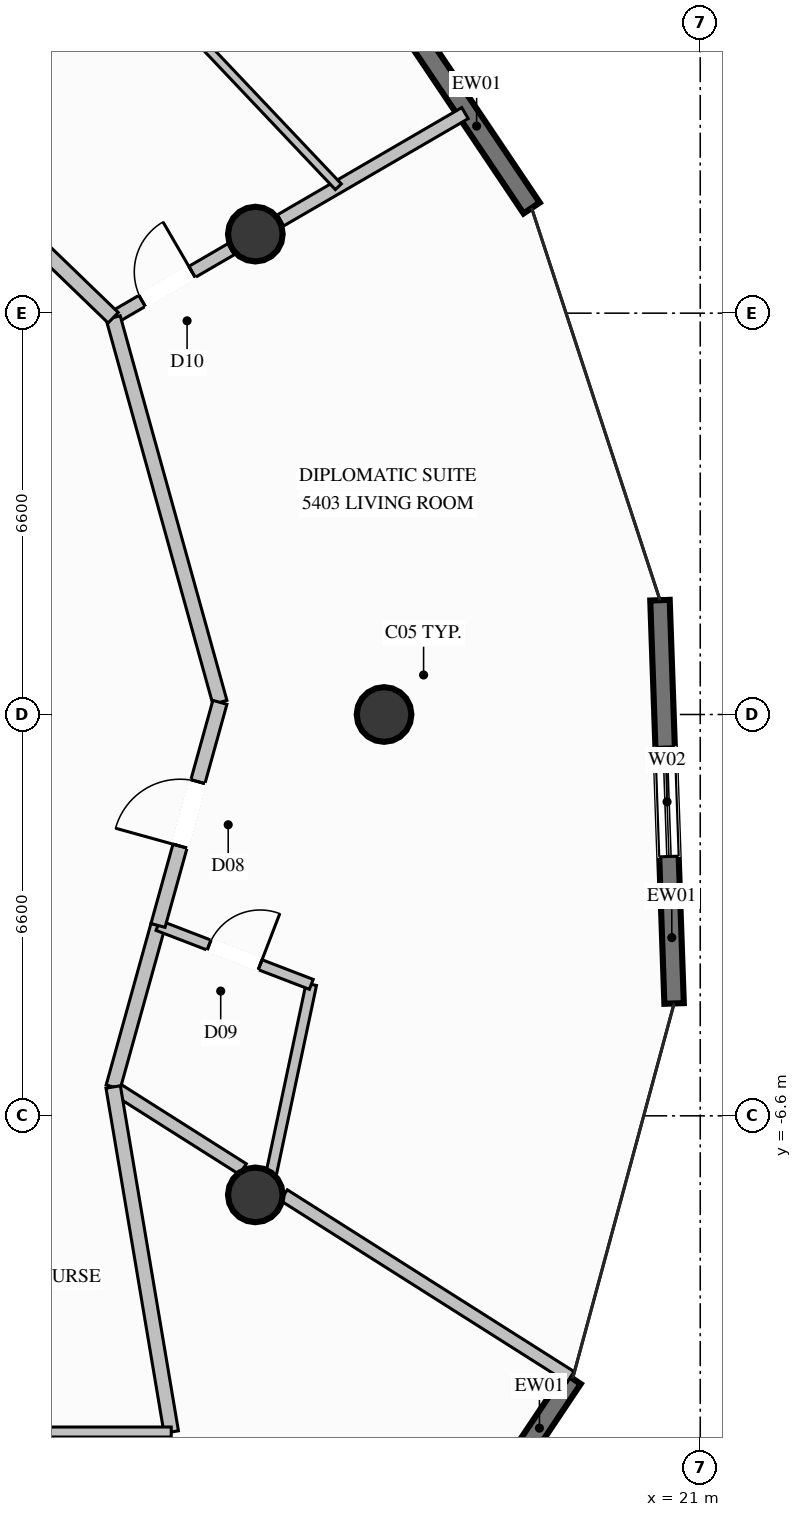
"""IFC4 building model, lengths in metres.
Left out: names, types, materials, properties, quantities, classifications, styles, units other than length and angle.
Written with IfcOpenShell. Run it as: python <this file> out.ifc"""

import sys

from ifc_helpers import new_model, si_unit, direction, frame, frame_2d, origin, origin_2d, place, context, subcontext, project, spatial, rectangle, circle, extrude, element, fill, save


model = new_model("IFC4")
c1 = context("Model", 3, precision=1e-05, world=origin(), true_north=direction((0.0, 1.0)))
c2 = subcontext(c1, "Body", "Model", "MODEL_VIEW")
j1 = project(units=[si_unit("LENGTHUNIT", "METRE"), si_unit("PLANEANGLEUNIT", "RADIAN")], contexts=[c1])
p1 = place(None, origin())
s1 = spatial("IfcSite", under=j1, at=p1, CompositionType="ELEMENT")
p2 = place(p1, origin())
s2 = spatial("IfcBuilding", under=s1, at=p2, CompositionType="ELEMENT")
p3 = place(p2, frame((0.0, 0.0, 202.0)))
s3 = spatial("IfcBuildingStorey", under=s2, at=p3, CompositionType="ELEMENT", Elevation=202.0)
for number, where, z_axis, x_axis in (
    (1, (15.8, 0.0, 0.0), (0.0, 0.0, 1.0), (1.0, 0.0, 0.0)),
    (2, (13.683, 7.9, 0.0), (0.0, 0.0, 1.0), (1.0, 0.0, 0.0)),
    (3, (13.683, -7.9, 0.0), (0.0, 0.0, 1.0), (1.0, 0.0, 0.0)),
):
    element("IfcColumn", number, at=place(p3, frame(where, z_axis=z_axis, x_axis=x_axis)), inside=s3, PredefinedType="COLUMN", context=c2, shape_type="SweptSolid", body=[
        extrude(circle(Radius=0.45, at=origin_2d()), origin(), (0.0, 0.0, 1.0), 3.6),
    ])
p4 = place(p3, frame((18.901, -10.92, 0.0), z_axis=(0.0, 0.0, 1.0), x_axis=(-0.55549022161, -0.831523068649, 0.0)))
e4 = element("IfcWall", 4, at=p4, inside=s3, PredefinedType="SOLIDWALL", context=c2, shape_type="SweptSolid", body=[
    extrude(rectangle(XDim=6.131, YDim=0.32, at=frame_2d((3.065, 0.0))), origin(), (0.0, 0.0, 1.0), 3.36),
])
p5 = place(p4, frame((2.214, 0.0, 0.35)))
e5 = element("IfcOpeningElement", 5, at=p5, cuts=e4, PredefinedType="OPENING", context=c2, shape_type="SweptSolid", body=[
    extrude(rectangle(XDim=1.8, YDim=2.6, at=frame_2d((0.9, 1.3))), frame((0.0, 0.17, 0.0), z_axis=(0.0, -1.0, 0.0), x_axis=(1.0, 0.0, 0.0)), (0.0, 0.0, 1.0), 0.34),
])
p6 = place(p3, frame((20.338, 1.88, 0.0), z_axis=(0.0, 0.0, 1.0), x_axis=(0.034988136102, -0.999387727727, 0.0)))
e6 = element("IfcWall", 6, at=p6, inside=s3, PredefinedType="SOLIDWALL", context=c2, shape_type="SweptSolid", body=[
    extrude(rectangle(XDim=6.636, YDim=0.32, at=frame_2d((3.318, 0.0))), origin(), (0.0, 0.0, 1.0), 3.36),
])
p7 = place(p6, frame((2.418, 0.0, 0.35)))
e7 = element("IfcOpeningElement", 7, at=p7, cuts=e6, PredefinedType="OPENING", context=c2, shape_type="SweptSolid", body=[
    extrude(rectangle(XDim=1.8, YDim=2.6, at=frame_2d((0.9, 1.3))), frame((0.0, 0.17, 0.0), z_axis=(0.0, -1.0, 0.0), x_axis=(1.0, 0.0, 0.0)), (0.0, 0.0, 1.0), 0.34),
])
p8 = place(p3, frame((14.445, 13.962, 0.0), z_axis=(0.0, 0.0, 1.0), x_axis=(0.557429227347, -0.830224461516, 0.0)))
e8 = element("IfcWall", 8, at=p8, inside=s3, PredefinedType="SOLIDWALL", context=c2, shape_type="SweptSolid", body=[
    extrude(rectangle(XDim=6.785, YDim=0.32, at=frame_2d((3.392, 0.0))), origin(), (0.0, 0.0, 1.0), 3.36),
])
p9 = place(p8, frame((1.489, 0.0, 0.35)))
e9 = element("IfcOpeningElement", 9, at=p9, cuts=e8, PredefinedType="OPENING", context=c2, shape_type="SweptSolid", body=[
    extrude(rectangle(XDim=1.8, YDim=2.6, at=frame_2d((0.9, 1.3))), frame((0.0, 0.17, 0.0), z_axis=(0.0, -1.0, 0.0), x_axis=(1.0, 0.0, 0.0)), (0.0, 0.0, 1.0), 0.34),
])
p10 = place(p3, frame((11.345, 6.525, 0.0), z_axis=(0.0, 0.0, 1.0), x_axis=(0.864528085785, 0.502584509201, 0.0)))
e10 = element("IfcWall", 10, at=p10, inside=s3, PredefinedType="PARTITIONING", context=c2, shape_type="SweptSolid", body=[
    extrude(rectangle(XDim=2.243, YDim=0.21, at=frame_2d((1.122, 0.0))), origin(), (0.0, 0.0, 1.0), 2.801),
])
p11 = place(p10, frame((0.55, 0.0, 0.0)))
e11 = element("IfcOpeningElement", 11, at=p11, cuts=e10, PredefinedType="OPENING", context=c2, shape_type="SweptSolid", body=[
    extrude(rectangle(XDim=0.95, YDim=2.1, at=frame_2d((0.475, 1.05))), frame((0.0, 0.115, 0.0), z_axis=(0.0, -1.0, 0.0), x_axis=(1.0, 0.0, 0.0)), (0.0, 0.0, 1.0), 0.23),
])
p12 = place(p3, frame((14.096, 8.125, 0.0), z_axis=(0.0, 0.0, 1.0), x_axis=(0.864474159334, 0.502677260121, 0.0)))
e12 = element("IfcWall", 12, at=p12, inside=s3, PredefinedType="PARTITIONING", context=c2, shape_type="SweptSolid", body=[
    extrude(rectangle(XDim=3.511, YDim=0.21, at=frame_2d((1.755, 0.0))), origin(), (0.0, 0.0, 1.0), 3.36),
])
p13 = place(p3, frame((11.345, -6.125, 0.0), z_axis=(0.0, 0.0, 1.0), x_axis=(0.844619463995, -0.535367127344, 0.0)))
e13 = element("IfcWall", 13, at=p13, inside=s3, PredefinedType="PARTITIONING", context=c2, shape_type="SweptSolid", body=[
    extrude(rectangle(XDim=2.525, YDim=0.21, at=frame_2d((1.263, 0.0))), origin(), (0.0, 0.0, 1.0), 2.801),
])
p14 = place(p3, frame((14.153, -7.905, 0.0), z_axis=(0.0, 0.0, 1.0), x_axis=(0.844580451792, -0.535428669806, 0.0)))
e14 = element("IfcWall", 14, at=p14, inside=s3, PredefinedType="PARTITIONING", context=c2, shape_type="SweptSolid", body=[
    extrude(rectangle(XDim=5.583, YDim=0.21, at=frame_2d((2.791, 0.0))), origin(), (0.0, 0.0, 1.0), 3.36),
])
p15 = place(p3, frame((11.345, -6.125, 0.0), z_axis=(0.0, 0.0, 1.0), x_axis=(0.267401739017, 0.963585133743, 0.0)))
e15 = element("IfcWall", 15, at=p15, inside=s3, PredefinedType="PARTITIONING", context=c2, shape_type="SweptSolid", body=[
    extrude(rectangle(XDim=2.756, YDim=0.24, at=frame_2d((1.378, 0.0))), origin(), (0.0, 0.0, 1.0), 3.36),
])
p16 = place(p3, frame((13.903, -7.746, 0.0), z_axis=(0.0, 0.0, 1.0), x_axis=(0.207003777915, 0.978340143268, 0.0)))
e16 = element("IfcWall", 16, at=p16, inside=s3, PredefinedType="PLUMBINGWALL", context=c2, shape_type="SweptSolid", body=[
    extrude(rectangle(XDim=3.381, YDim=0.175, at=frame_2d((1.691, 0.0))), origin(), (0.0, 0.0, 1.0), 2.929),
])
p17 = place(p3, frame((12.082, -3.469, 0.0), z_axis=(0.0, 0.0, 1.0), x_axis=(0.933422467447, -0.358779176186, 0.0)))
e17 = element("IfcWall", 17, at=p17, inside=s3, PredefinedType="PLUMBINGWALL", context=c2, shape_type="SweptSolid", body=[
    extrude(rectangle(XDim=2.701, YDim=0.175, at=frame_2d((1.351, 0.0))), origin(), (0.0, 0.0, 1.0), 3.36),
])
p18 = place(p17, frame((0.9, 0.0, 0.0)))
e18 = element("IfcOpeningElement", 18, at=p18, cuts=e17, PredefinedType="OPENING", context=c2, shape_type="SweptSolid", body=[
    extrude(rectangle(XDim=0.9, YDim=2.1, at=frame_2d((0.45, 1.05))), frame((0.0, 0.098, 0.0), z_axis=(0.0, -1.0, 0.0), x_axis=(1.0, 0.0, 0.0)), (0.0, 0.0, 1.0), 0.195),
])
p19 = place(p3, frame((13.1, 0.2, 0.0), z_axis=(0.0, 0.0, 1.0), x_axis=(-0.26738871748, 0.963588747218, 0.0)))
e19 = element("IfcWall", 19, at=p19, inside=s3, PredefinedType="PARTITIONING", context=c2, shape_type="SweptSolid", body=[
    extrude(rectangle(XDim=6.564, YDim=0.24, at=frame_2d((3.282, 0.0))), origin(), (0.0, 0.0, 1.0), 3.36),
])
p20 = place(p3, frame((12.082, -3.469, 0.0), z_axis=(0.0, 0.0, 1.0), x_axis=(0.267379290897, 0.963591362975, 0.0)))
e20 = element("IfcWall", 20, at=p20, inside=s3, PredefinedType="PARTITIONING", context=c2, shape_type="SweptSolid", body=[
    extrude(rectangle(XDim=3.808, YDim=0.24, at=frame_2d((1.904, 0.0))), origin(), (0.0, 0.0, 1.0), 3.36),
])
p21 = place(p20, frame((1.354, 0.0, 0.0)))
e21 = element("IfcOpeningElement", 21, at=p21, cuts=e20, PredefinedType="OPENING", context=c2, shape_type="SweptSolid", body=[
    extrude(rectangle(XDim=1.1, YDim=2.3, at=frame_2d((0.55, 1.15))), frame((0.0, 0.13, 0.0), z_axis=(0.0, -1.0, 0.0), x_axis=(1.0, 0.0, 0.0)), (0.0, 0.0, 1.0), 0.26),
])
p22 = place(p3, frame((11.345, 6.525, 0.0), z_axis=(0.0, 0.0, 1.0), x_axis=(-0.719360436772, 0.694637000172, 0.0)))
e22 = element("IfcWall", 22, at=p22, inside=s3, PredefinedType="PARTITIONING", context=c2, shape_type="SweptSolid", body=[
    extrude(rectangle(XDim=6.666, YDim=0.24, at=frame_2d((3.333, 0.0))), origin(), (0.0, 0.0, 1.0), 3.36),
])
p23 = place(p3, frame((15.048, 8.679, 0.0), z_axis=(0.0, 0.0, 1.0), x_axis=(-0.687476978128, 0.726206172202, 0.0)))
e23 = element("IfcWall", 23, at=p23, inside=s3, PredefinedType="PARTITIONING", context=c2, shape_type="SweptSolid", body=[
    extrude(rectangle(XDim=9.033, YDim=0.135, at=frame_2d((4.517, 0.0))), origin(), (0.0, 0.0, 1.0), 3.36),
])
p24 = place(p23, frame((4.042, 0.0, 0.0)))
e24 = element("IfcOpeningElement", 24, at=p24, cuts=e23, PredefinedType="OPENING", context=c2, shape_type="SweptSolid", body=[
    extrude(rectangle(XDim=0.95, YDim=2.1, at=frame_2d((0.475, 1.05))), frame((0.0, 0.078, 0.0), z_axis=(0.0, -1.0, 0.0), x_axis=(1.0, 0.0, 0.0)), (0.0, 0.0, 1.0), 0.155),
])
p25 = place(p3, frame((12.3, -11.8, 0.0), z_axis=(0.0, 0.0, 1.0), x_axis=(-0.165960421789, 0.986132414232, 0.0)))
e25 = element("IfcWall", 25, at=p25, inside=s3, PredefinedType="PARTITIONING", context=c2, shape_type="SweptSolid", body=[
    extrude(rectangle(XDim=5.755, YDim=0.24, at=frame_2d((2.877, 0.0))), origin(), (0.0, 0.0, 1.0), 3.36),
])
p26 = place(p3, frame((0.0, -11.8, 0.0), z_axis=(0.0, 0.0, 1.0), x_axis=(1.0, 0.0, 0.0)))
e26 = element("IfcWall", 26, at=p26, inside=s3, PredefinedType="PARTITIONING", context=c2, shape_type="SweptSolid", body=[
    extrude(rectangle(XDim=12.3, YDim=0.165, at=frame_2d((6.15, 0.0))), origin(), (0.0, 0.0, 1.0), 3.36),
])
p27 = place(p26, frame((5.675, 0.0, 0.0)))
e27 = element("IfcOpeningElement", 27, at=p27, cuts=e26, PredefinedType="OPENING", context=c2, shape_type="SweptSolid", body=[
    extrude(rectangle(XDim=0.95, YDim=2.1, at=frame_2d((0.475, 1.05))), frame((0.0, 0.093, 0.0), z_axis=(0.0, -1.0, 0.0), x_axis=(1.0, 0.0, 0.0)), (0.0, 0.0, 1.0), 0.185),
])
p28 = place(p7, origin())
e28 = element("IfcWindow", 28, at=p28, inside=s3, PartitioningType="SINGLE_PANEL", PredefinedType="WINDOW", context=c2, shape_type="SweptSolid", body=[
    extrude(rectangle(XDim=1.8, YDim=2.6, at=frame_2d((0.9, 1.3))), frame((0.0, 0.03, 0.0), z_axis=(0.0, -1.0, 0.0), x_axis=(1.0, 0.0, 0.0)), (0.0, 0.0, 1.0), 0.06),
])
fill(e7, e28)
p29 = place(p18, origin())
e29 = element("IfcDoor", 29, at=p29, inside=s3, OperationType="SINGLE_SWING_RIGHT", PredefinedType="DOOR", context=c2, shape_type="SweptSolid", body=[
    extrude(rectangle(XDim=0.9, YDim=2.1, at=frame_2d((0.45, 1.05))), frame((0.0, 0.025, 0.0), z_axis=(0.0, -1.0, 0.0), x_axis=(1.0, 0.0, 0.0)), (0.0, 0.0, 1.0), 0.05),
])
fill(e18, e29)
p30 = place(p21, origin())
e30 = element("IfcDoor", 30, at=p30, inside=s3, OperationType="SINGLE_SWING_LEFT", PredefinedType="DOOR", context=c2, shape_type="SweptSolid", body=[
    extrude(rectangle(XDim=1.1, YDim=2.3, at=frame_2d((0.55, 1.15))), frame((0.0, 0.025, 0.0), z_axis=(0.0, -1.0, 0.0), x_axis=(1.0, 0.0, 0.0)), (0.0, 0.0, 1.0), 0.05),
])
fill(e21, e30)
p31 = place(p11, origin())
e31 = element("IfcDoor", 31, at=p31, inside=s3, OperationType="SINGLE_SWING_RIGHT", PredefinedType="DOOR", context=c2, shape_type="SweptSolid", body=[
    extrude(rectangle(XDim=0.95, YDim=2.1, at=frame_2d((0.475, 1.05))), frame((0.0, 0.025, 0.0), z_axis=(0.0, -1.0, 0.0), x_axis=(1.0, 0.0, 0.0)), (0.0, 0.0, 1.0), 0.05),
])
fill(e11, e31)
save(model, sys.argv[1])
